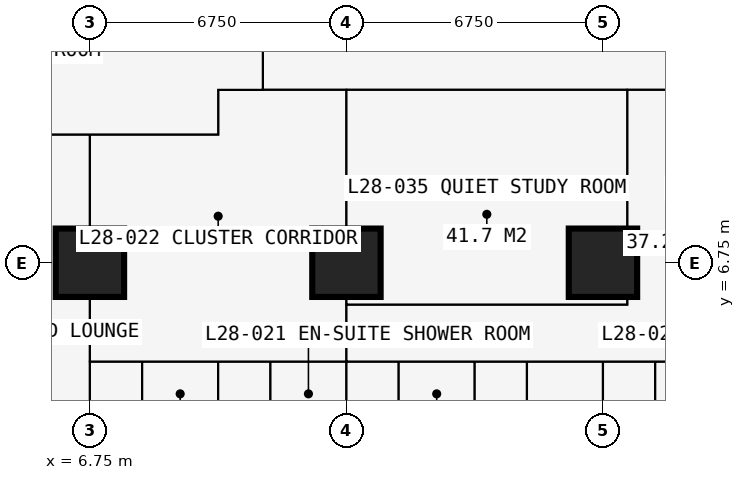
"""IFC4 building model, lengths in metres.
Left out: names, types, materials, properties, quantities, classifications, styles, units other than length and angle.
Written with IfcOpenShell. Run it as: python <this file> out.ifc"""

import sys

from ifc_helpers import new_model, si_unit, direction, frame, frame_2d, origin, origin_2d, place, context, subcontext, project, spatial, rectangle, extrude, element, fill, save


model = new_model("IFC4")
c1 = context("Model", 3, precision=1e-05, world=origin(), true_north=direction((0.0, 1.0)))
c2 = subcontext(c1, "Body", "Model", "MODEL_VIEW")
j1 = project(units=[si_unit("LENGTHUNIT", "METRE"), si_unit("PLANEANGLEUNIT", "RADIAN")], contexts=[c1])
p1 = place(None, origin())
s1 = spatial("IfcSite", under=j1, at=p1, CompositionType="ELEMENT")
p2 = place(p1, origin())
s2 = spatial("IfcBuilding", under=s1, at=p2, CompositionType="ELEMENT")
p3 = place(p2, frame((0.0, 0.0, 105.3)))
s3 = spatial("IfcBuildingStorey", under=s2, at=p3, CompositionType="ELEMENT", Elevation=105.3)
for number, where, z_axis, x_axis in (
    (1, (6.75, 6.75, 0.0), (0.0, 0.0, 1.0), (1.0, 0.0, 0.0)),
    (2, (13.5, 6.75, 0.0), (0.0, 0.0, 1.0), (1.0, 0.0, 0.0)),
    (3, (20.25, 6.75, 0.0), (0.0, 0.0, 1.0), (1.0, 0.0, 0.0)),
):
    element("IfcColumn", number, at=place(p3, frame(where, z_axis=z_axis, x_axis=x_axis)), inside=s3, PredefinedType="COLUMN", context=c2, shape_type="SweptSolid", body=[
        extrude(rectangle(XDim=1.8, YDim=1.8, at=origin_2d()), origin(), (0.0, 0.0, 1.0), 3.6),
    ])
p4 = place(p3, frame((-0.734, 10.125, 0.0), z_axis=(0.0, 0.0, 1.0), x_axis=(1.0, 0.0, 0.0)))
e4 = element("IfcWall", 4, at=p4, inside=s3, PredefinedType="PARTITIONING", context=c2, shape_type="SweptSolid", body=[
    extrude(rectangle(XDim=10.859, YDim=0.15, at=frame_2d((5.429, 0.0))), origin(), (0.0, 0.0, 1.0), 3.375),
])
p5 = place(p4, frame((5.134, 0.0, 0.0)))
e5 = element("IfcOpeningElement", 5, at=p5, cuts=e4, PredefinedType="OPENING", context=c2, shape_type="SweptSolid", body=[
    extrude(rectangle(XDim=1.0, YDim=2.2, at=frame_2d((0.5, 1.1))), frame((0.0, 0.085, 0.0), z_axis=(0.0, -1.0, 0.0), x_axis=(1.0, 0.0, 0.0)), (0.0, 0.0, 1.0), 0.17),
])
p6 = place(p3, frame((6.75, -0.734, 0.0), z_axis=(0.0, 0.0, 1.0), x_axis=(0.0, 1.0, 0.0)))
e6 = element("IfcWall", 6, at=p6, inside=s3, PredefinedType="PARTITIONING", context=c2, shape_type="SweptSolid", body=[
    extrude(rectangle(XDim=10.859, YDim=0.15, at=frame_2d((5.429, 0.0))), origin(), (0.0, 0.0, 1.0), 2.877),
])
p7 = place(p3, frame((6.75, 4.15, 0.0), z_axis=(0.0, 0.0, 1.0), x_axis=(1.0, 0.0, 0.0)))
e7 = element("IfcWall", 7, at=p7, inside=s3, PredefinedType="PARTITIONING", context=c2, shape_type="SweptSolid", body=[
    extrude(rectangle(XDim=23.625, YDim=0.1, at=frame_2d((11.812, 0.0))), origin(), (0.0, 0.0, 1.0), 3.375),
])
p8 = place(p7, frame((0.2, 0.0, 0.0)))
e8 = element("IfcOpeningElement", 8, at=p8, cuts=e7, PredefinedType="OPENING", context=c2, shape_type="SweptSolid", body=[
    extrude(rectangle(XDim=0.95, YDim=2.2, at=frame_2d((0.475, 1.1))), frame((0.0, 0.06, 0.0), z_axis=(0.0, -1.0, 0.0), x_axis=(1.0, 0.0, 0.0)), (0.0, 0.0, 1.0), 0.12),
])
p9 = place(p7, frame((3.625, 0.0, 0.0)))
e9 = element("IfcOpeningElement", 9, at=p9, cuts=e7, PredefinedType="OPENING", context=c2, shape_type="SweptSolid", body=[
    extrude(rectangle(XDim=0.95, YDim=2.2, at=frame_2d((0.475, 1.1))), frame((0.0, 0.06, 0.0), z_axis=(0.0, -1.0, 0.0), x_axis=(1.0, 0.0, 0.0)), (0.0, 0.0, 1.0), 0.12),
])
p10 = place(p7, frame((6.95, 0.0, 0.0)))
e10 = element("IfcOpeningElement", 10, at=p10, cuts=e7, PredefinedType="OPENING", context=c2, shape_type="SweptSolid", body=[
    extrude(rectangle(XDim=0.95, YDim=2.2, at=frame_2d((0.475, 1.1))), frame((0.0, 0.06, 0.0), z_axis=(0.0, -1.0, 0.0), x_axis=(1.0, 0.0, 0.0)), (0.0, 0.0, 1.0), 0.12),
])
p11 = place(p7, frame((10.375, 0.0, 0.0)))
e11 = element("IfcOpeningElement", 11, at=p11, cuts=e7, PredefinedType="OPENING", context=c2, shape_type="SweptSolid", body=[
    extrude(rectangle(XDim=0.95, YDim=2.2, at=frame_2d((0.475, 1.1))), frame((0.0, 0.06, 0.0), z_axis=(0.0, -1.0, 0.0), x_axis=(1.0, 0.0, 0.0)), (0.0, 0.0, 1.0), 0.12),
])
p12 = place(p7, frame((13.75, 0.0, 0.0)))
e12 = element("IfcOpeningElement", 12, at=p12, cuts=e7, PredefinedType="OPENING", context=c2, shape_type="SweptSolid", body=[
    extrude(rectangle(XDim=0.95, YDim=2.2, at=frame_2d((0.475, 1.1))), frame((0.0, 0.06, 0.0), z_axis=(0.0, -1.0, 0.0), x_axis=(1.0, 0.0, 0.0)), (0.0, 0.0, 1.0), 0.12),
])
p13 = place(p7, frame((17.125, 0.0, 0.0)))
e13 = element("IfcOpeningElement", 13, at=p13, cuts=e7, PredefinedType="OPENING", context=c2, shape_type="SweptSolid", body=[
    extrude(rectangle(XDim=0.95, YDim=2.2, at=frame_2d((0.475, 1.1))), frame((0.0, 0.06, 0.0), z_axis=(0.0, -1.0, 0.0), x_axis=(1.0, 0.0, 0.0)), (0.0, 0.0, 1.0), 0.12),
])
p14 = place(p7, frame((20.5, 0.0, 0.0)))
e14 = element("IfcOpeningElement", 14, at=p14, cuts=e7, PredefinedType="OPENING", context=c2, shape_type="SweptSolid", body=[
    extrude(rectangle(XDim=0.95, YDim=2.2, at=frame_2d((0.475, 1.1))), frame((0.0, 0.06, 0.0), z_axis=(0.0, -1.0, 0.0), x_axis=(1.0, 0.0, 0.0)), (0.0, 0.0, 1.0), 0.12),
])
p15 = place(p3, frame((8.125, 1.95, 0.0), z_axis=(0.0, 0.0, 1.0), x_axis=(0.0, 1.0, 0.0)))
e15 = element("IfcWall", 15, at=p15, inside=s3, PredefinedType="PARTITIONING", context=c2, shape_type="SweptSolid", body=[
    extrude(rectangle(XDim=2.2, YDim=0.1, at=frame_2d((1.1, 0.0))), origin(), (0.0, 0.0, 1.0), 3.375),
])
p16 = place(p15, frame((0.65, 0.0, 0.0)))
e16 = element("IfcOpeningElement", 16, at=p16, cuts=e15, PredefinedType="OPENING", context=c2, shape_type="SweptSolid", body=[
    extrude(rectangle(XDim=0.9, YDim=2.2, at=frame_2d((0.45, 1.1))), frame((0.0, 0.06, 0.0), z_axis=(0.0, -1.0, 0.0), x_axis=(1.0, 0.0, 0.0)), (0.0, 0.0, 1.0), 0.12),
])
p17 = place(p3, frame((10.125, -0.734, 0.0), z_axis=(0.0, 0.0, 1.0), x_axis=(0.0, 1.0, 0.0)))
e17 = element("IfcWall", 17, at=p17, inside=s3, PredefinedType="PARTITIONING", context=c2, shape_type="SweptSolid", body=[
    extrude(rectangle(XDim=4.884, YDim=0.175, at=frame_2d((2.442, 0.0))), origin(), (0.0, 0.0, 1.0), 3.375),
])
p18 = place(p3, frame((10.125, 10.125, 0.0), z_axis=(0.0, 0.0, 1.0), x_axis=(0.0, 1.0, 0.0)))
e18 = element("IfcWall", 18, at=p18, inside=s3, PredefinedType="PARTITIONING", context=c2, shape_type="SweptSolid", body=[
    extrude(rectangle(XDim=1.175, YDim=0.15, at=frame_2d((0.587, 0.0))), origin(), (0.0, 0.0, 1.0), 3.375),
])
p19 = place(p3, frame((10.125, 11.3, 0.0), z_axis=(0.0, 0.0, 1.0), x_axis=(1.0, 0.0, 0.0)))
e19 = element("IfcWall", 19, at=p19, inside=s3, PredefinedType="PARTITIONING", context=c2, shape_type="SweptSolid", body=[
    extrude(rectangle(XDim=20.675, YDim=0.15, at=frame_2d((10.337, 0.0))), origin(), (0.0, 0.0, 1.0), 3.375),
])
p20 = place(p19, frame((1.775, 0.0, 0.0)))
e20 = element("IfcOpeningElement", 20, at=p20, cuts=e19, PredefinedType="OPENING", context=c2, shape_type="SweptSolid", body=[
    extrude(rectangle(XDim=1.0, YDim=2.2, at=frame_2d((0.5, 1.1))), frame((0.0, 0.085, 0.0), z_axis=(0.0, -1.0, 0.0), x_axis=(1.0, 0.0, 0.0)), (0.0, 0.0, 1.0), 0.17),
])
p21 = place(p19, frame((11.312, 0.0, 0.0)))
e21 = element("IfcOpeningElement", 21, at=p21, cuts=e19, PredefinedType="OPENING", context=c2, shape_type="SweptSolid", body=[
    extrude(rectangle(XDim=1.0, YDim=2.2, at=frame_2d((0.5, 1.1))), frame((0.0, 0.085, 0.0), z_axis=(0.0, -1.0, 0.0), x_axis=(1.0, 0.0, 0.0)), (0.0, 0.0, 1.0), 0.17),
])
p22 = place(p3, frame((11.3, 11.3, 0.0), z_axis=(0.0, 0.0, 1.0), x_axis=(0.0, 1.0, 0.0)))
e22 = element("IfcWall", 22, at=p22, inside=s3, PredefinedType="PARTITIONING", context=c2, shape_type="SweptSolid", body=[
    extrude(rectangle(XDim=19.3, YDim=0.15, at=frame_2d((9.65, 0.0))), origin(), (0.0, 0.0, 1.0), 3.375),
])
p23 = place(p22, frame((13.525, 0.0, 0.0)))
e23 = element("IfcOpeningElement", 23, at=p23, cuts=e22, PredefinedType="OPENING", context=c2, shape_type="SweptSolid", body=[
    extrude(rectangle(XDim=1.0, YDim=2.2, at=frame_2d((0.5, 1.1))), frame((0.0, 0.085, 0.0), z_axis=(0.0, -1.0, 0.0), x_axis=(1.0, 0.0, 0.0)), (0.0, 0.0, 1.0), 0.17),
])
p24 = place(p22, frame((10.438, 0.0, 0.0)))
e24 = element("IfcOpeningElement", 24, at=p24, cuts=e22, PredefinedType="OPENING", context=c2, shape_type="SweptSolid", body=[
    extrude(rectangle(XDim=1.0, YDim=2.2, at=frame_2d((0.5, 1.1))), frame((0.0, 0.085, 0.0), z_axis=(0.0, -1.0, 0.0), x_axis=(1.0, 0.0, 0.0)), (0.0, 0.0, 1.0), 0.17),
])
p25 = place(p3, frame((11.5, 1.95, 0.0), z_axis=(0.0, 0.0, 1.0), x_axis=(0.0, 1.0, 0.0)))
e25 = element("IfcWall", 25, at=p25, inside=s3, PredefinedType="PARTITIONING", context=c2, shape_type="SweptSolid", body=[
    extrude(rectangle(XDim=2.2, YDim=0.1, at=frame_2d((1.1, 0.0))), origin(), (0.0, 0.0, 1.0), 3.375),
])
p26 = place(p25, frame((0.65, 0.0, 0.0)))
e26 = element("IfcOpeningElement", 26, at=p26, cuts=e25, PredefinedType="OPENING", context=c2, shape_type="SweptSolid", body=[
    extrude(rectangle(XDim=0.9, YDim=2.2, at=frame_2d((0.45, 1.1))), frame((0.0, 0.06, 0.0), z_axis=(0.0, -1.0, 0.0), x_axis=(1.0, 0.0, 0.0)), (0.0, 0.0, 1.0), 0.12),
])
p27 = place(p3, frame((13.5, -0.734, 0.0), z_axis=(0.0, 0.0, 1.0), x_axis=(0.0, 1.0, 0.0)))
e27 = element("IfcWall", 27, at=p27, inside=s3, PredefinedType="PARTITIONING", context=c2, shape_type="SweptSolid", body=[
    extrude(rectangle(XDim=12.034, YDim=0.15, at=frame_2d((6.017, 0.0))), origin(), (0.0, 0.0, 1.0), 2.61),
])
p28 = place(p3, frame((13.5, 5.65, 0.0), z_axis=(0.0, 0.0, 1.0), x_axis=(1.0, 0.0, 0.0)))
e28 = element("IfcWall", 28, at=p28, inside=s3, PredefinedType="PARTITIONING", context=c2, shape_type="SweptSolid", body=[
    extrude(rectangle(XDim=7.387, YDim=0.15, at=frame_2d((3.694, 0.0))), origin(), (0.0, 0.0, 1.0), 3.375),
])
p29 = place(p28, frame((3.2, 0.0, 0.0)))
e29 = element("IfcOpeningElement", 29, at=p29, cuts=e28, PredefinedType="OPENING", context=c2, shape_type="SweptSolid", body=[
    extrude(rectangle(XDim=0.95, YDim=2.2, at=frame_2d((0.475, 1.1))), frame((0.0, 0.085, 0.0), z_axis=(0.0, -1.0, 0.0), x_axis=(1.0, 0.0, 0.0)), (0.0, 0.0, 1.0), 0.17),
])
p30 = place(p3, frame((14.875, 1.95, 0.0), z_axis=(0.0, 0.0, 1.0), x_axis=(0.0, 1.0, 0.0)))
e30 = element("IfcWall", 30, at=p30, inside=s3, PredefinedType="PARTITIONING", context=c2, shape_type="SweptSolid", body=[
    extrude(rectangle(XDim=2.2, YDim=0.1, at=frame_2d((1.1, 0.0))), origin(), (0.0, 0.0, 1.0), 3.375),
])
p31 = place(p30, frame((0.65, 0.0, 0.0)))
e31 = element("IfcOpeningElement", 31, at=p31, cuts=e30, PredefinedType="OPENING", context=c2, shape_type="SweptSolid", body=[
    extrude(rectangle(XDim=0.9, YDim=2.2, at=frame_2d((0.45, 1.1))), frame((0.0, 0.06, 0.0), z_axis=(0.0, -1.0, 0.0), x_axis=(1.0, 0.0, 0.0)), (0.0, 0.0, 1.0), 0.12),
])
p32 = place(p3, frame((16.875, -0.734, 0.0), z_axis=(0.0, 0.0, 1.0), x_axis=(0.0, 1.0, 0.0)))
e32 = element("IfcWall", 32, at=p32, inside=s3, PredefinedType="PARTITIONING", context=c2, shape_type="SweptSolid", body=[
    extrude(rectangle(XDim=4.884, YDim=0.175, at=frame_2d((2.442, 0.0))), origin(), (0.0, 0.0, 1.0), 3.375),
])
p33 = place(p3, frame((18.25, 1.95, 0.0), z_axis=(0.0, 0.0, 1.0), x_axis=(0.0, 1.0, 0.0)))
e33 = element("IfcWall", 33, at=p33, inside=s3, PredefinedType="PARTITIONING", context=c2, shape_type="SweptSolid", body=[
    extrude(rectangle(XDim=2.2, YDim=0.1, at=frame_2d((1.1, 0.0))), origin(), (0.0, 0.0, 1.0), 3.375),
])
p34 = place(p33, frame((0.65, 0.0, 0.0)))
e34 = element("IfcOpeningElement", 34, at=p34, cuts=e33, PredefinedType="OPENING", context=c2, shape_type="SweptSolid", body=[
    extrude(rectangle(XDim=0.9, YDim=2.2, at=frame_2d((0.45, 1.1))), frame((0.0, 0.06, 0.0), z_axis=(0.0, -1.0, 0.0), x_axis=(1.0, 0.0, 0.0)), (0.0, 0.0, 1.0), 0.12),
])
p35 = place(p3, frame((20.25, -0.734, 0.0), z_axis=(0.0, 0.0, 1.0), x_axis=(0.0, 1.0, 0.0)))
e35 = element("IfcWall", 35, at=p35, inside=s3, PredefinedType="PARTITIONING", context=c2, shape_type="SweptSolid", body=[
    extrude(rectangle(XDim=4.884, YDim=0.175, at=frame_2d((2.442, 0.0))), origin(), (0.0, 0.0, 1.0), 2.61),
])
p36 = place(p3, frame((20.887, 5.65, 0.0), z_axis=(0.0, 0.0, 1.0), x_axis=(0.0, 1.0, 0.0)))
e36 = element("IfcWall", 36, at=p36, inside=s3, PredefinedType="PARTITIONING", context=c2, shape_type="SweptSolid", body=[
    extrude(rectangle(XDim=5.65, YDim=0.15, at=frame_2d((2.825, 0.0))), origin(), (0.0, 0.0, 1.0), 3.375),
])
p37 = place(p3, frame((21.625, 1.95, 0.0), z_axis=(0.0, 0.0, 1.0), x_axis=(0.0, 1.0, 0.0)))
e37 = element("IfcWall", 37, at=p37, inside=s3, PredefinedType="PARTITIONING", context=c2, shape_type="SweptSolid", body=[
    extrude(rectangle(XDim=2.2, YDim=0.1, at=frame_2d((1.1, 0.0))), origin(), (0.0, 0.0, 1.0), 3.375),
])
p38 = place(p37, frame((0.65, 0.0, 0.0)))
e38 = element("IfcOpeningElement", 38, at=p38, cuts=e37, PredefinedType="OPENING", context=c2, shape_type="SweptSolid", body=[
    extrude(rectangle(XDim=0.9, YDim=2.2, at=frame_2d((0.45, 1.1))), frame((0.0, 0.06, 0.0), z_axis=(0.0, -1.0, 0.0), x_axis=(1.0, 0.0, 0.0)), (0.0, 0.0, 1.0), 0.12),
])
p39 = place(p8, origin())
e39 = element("IfcDoor", 39, at=p39, inside=s3, OperationType="SINGLE_SWING_LEFT", PredefinedType="DOOR", context=c2, shape_type="SweptSolid", body=[
    extrude(rectangle(XDim=0.95, YDim=2.2, at=frame_2d((0.475, 1.1))), frame((0.0, 0.025, 0.0), z_axis=(0.0, -1.0, 0.0), x_axis=(1.0, 0.0, 0.0)), (0.0, 0.0, 1.0), 0.05),
])
fill(e8, e39)
p40 = place(p16, origin())
e40 = element("IfcDoor", 40, at=p40, inside=s3, OperationType="SINGLE_SWING_RIGHT", PredefinedType="DOOR", context=c2, shape_type="SweptSolid", body=[
    extrude(rectangle(XDim=0.9, YDim=2.2, at=frame_2d((0.45, 1.1))), frame((0.0, 0.025, 0.0), z_axis=(0.0, -1.0, 0.0), x_axis=(1.0, 0.0, 0.0)), (0.0, 0.0, 1.0), 0.05),
])
fill(e16, e40)
p41 = place(p9, origin())
e41 = element("IfcDoor", 41, at=p41, inside=s3, OperationType="SINGLE_SWING_LEFT", PredefinedType="DOOR", context=c2, shape_type="SweptSolid", body=[
    extrude(rectangle(XDim=0.95, YDim=2.2, at=frame_2d((0.475, 1.1))), frame((0.0, 0.025, 0.0), z_axis=(0.0, -1.0, 0.0), x_axis=(1.0, 0.0, 0.0)), (0.0, 0.0, 1.0), 0.05),
])
fill(e9, e41)
p42 = place(p26, origin())
e42 = element("IfcDoor", 42, at=p42, inside=s3, OperationType="SINGLE_SWING_RIGHT", PredefinedType="DOOR", context=c2, shape_type="SweptSolid", body=[
    extrude(rectangle(XDim=0.9, YDim=2.2, at=frame_2d((0.45, 1.1))), frame((0.0, 0.025, 0.0), z_axis=(0.0, -1.0, 0.0), x_axis=(1.0, 0.0, 0.0)), (0.0, 0.0, 1.0), 0.05),
])
fill(e26, e42)
p43 = place(p20, origin())
e43 = element("IfcDoor", 43, at=p43, inside=s3, OperationType="SINGLE_SWING_LEFT", PredefinedType="DOOR", context=c2, shape_type="SweptSolid", body=[
    extrude(rectangle(XDim=1.0, YDim=2.2, at=frame_2d((0.5, 1.1))), frame((0.0, 0.025, 0.0), z_axis=(0.0, -1.0, 0.0), x_axis=(1.0, 0.0, 0.0)), (0.0, 0.0, 1.0), 0.05),
])
fill(e20, e43)
p44 = place(p10, origin())
e44 = element("IfcDoor", 44, at=p44, inside=s3, OperationType="SINGLE_SWING_LEFT", PredefinedType="DOOR", context=c2, shape_type="SweptSolid", body=[
    extrude(rectangle(XDim=0.95, YDim=2.2, at=frame_2d((0.475, 1.1))), frame((0.0, 0.025, 0.0), z_axis=(0.0, -1.0, 0.0), x_axis=(1.0, 0.0, 0.0)), (0.0, 0.0, 1.0), 0.05),
])
fill(e10, e44)
p45 = place(p31, origin())
e45 = element("IfcDoor", 45, at=p45, inside=s3, OperationType="SINGLE_SWING_RIGHT", PredefinedType="DOOR", context=c2, shape_type="SweptSolid", body=[
    extrude(rectangle(XDim=0.9, YDim=2.2, at=frame_2d((0.45, 1.1))), frame((0.0, 0.025, 0.0), z_axis=(0.0, -1.0, 0.0), x_axis=(1.0, 0.0, 0.0)), (0.0, 0.0, 1.0), 0.05),
])
fill(e31, e45)
p46 = place(p11, origin())
e46 = element("IfcDoor", 46, at=p46, inside=s3, OperationType="SINGLE_SWING_LEFT", PredefinedType="DOOR", context=c2, shape_type="SweptSolid", body=[
    extrude(rectangle(XDim=0.95, YDim=2.2, at=frame_2d((0.475, 1.1))), frame((0.0, 0.025, 0.0), z_axis=(0.0, -1.0, 0.0), x_axis=(1.0, 0.0, 0.0)), (0.0, 0.0, 1.0), 0.05),
])
fill(e11, e46)
p47 = place(p34, origin())
e47 = element("IfcDoor", 47, at=p47, inside=s3, OperationType="SINGLE_SWING_RIGHT", PredefinedType="DOOR", context=c2, shape_type="SweptSolid", body=[
    extrude(rectangle(XDim=0.9, YDim=2.2, at=frame_2d((0.45, 1.1))), frame((0.0, 0.025, 0.0), z_axis=(0.0, -1.0, 0.0), x_axis=(1.0, 0.0, 0.0)), (0.0, 0.0, 1.0), 0.05),
])
fill(e34, e47)
p48 = place(p12, origin())
e48 = element("IfcDoor", 48, at=p48, inside=s3, OperationType="SINGLE_SWING_LEFT", PredefinedType="DOOR", context=c2, shape_type="SweptSolid", body=[
    extrude(rectangle(XDim=0.95, YDim=2.2, at=frame_2d((0.475, 1.1))), frame((0.0, 0.025, 0.0), z_axis=(0.0, -1.0, 0.0), x_axis=(1.0, 0.0, 0.0)), (0.0, 0.0, 1.0), 0.05),
])
fill(e12, e48)
p49 = place(p38, origin())
e49 = element("IfcDoor", 49, at=p49, inside=s3, OperationType="SINGLE_SWING_RIGHT", PredefinedType="DOOR", context=c2, shape_type="SweptSolid", body=[
    extrude(rectangle(XDim=0.9, YDim=2.2, at=frame_2d((0.45, 1.1))), frame((0.0, 0.025, 0.0), z_axis=(0.0, -1.0, 0.0), x_axis=(1.0, 0.0, 0.0)), (0.0, 0.0, 1.0), 0.05),
])
fill(e38, e49)
p50 = place(p21, origin())
e50 = element("IfcDoor", 50, at=p50, inside=s3, OperationType="SINGLE_SWING_LEFT", PredefinedType="DOOR", context=c2, shape_type="SweptSolid", body=[
    extrude(rectangle(XDim=1.0, YDim=2.2, at=frame_2d((0.5, 1.1))), frame((0.0, 0.025, 0.0), z_axis=(0.0, -1.0, 0.0), x_axis=(1.0, 0.0, 0.0)), (0.0, 0.0, 1.0), 0.05),
])
fill(e21, e50)
p51 = place(p29, origin())
e51 = element("IfcDoor", 51, at=p51, inside=s3, OperationType="SINGLE_SWING_LEFT", PredefinedType="DOOR", context=c2, shape_type="SweptSolid", body=[
    extrude(rectangle(XDim=0.95, YDim=2.2, at=frame_2d((0.475, 1.1))), frame((0.0, 0.025, 0.0), z_axis=(0.0, -1.0, 0.0), x_axis=(1.0, 0.0, 0.0)), (0.0, 0.0, 1.0), 0.05),
])
fill(e29, e51)
save(model, sys.argv[1])
